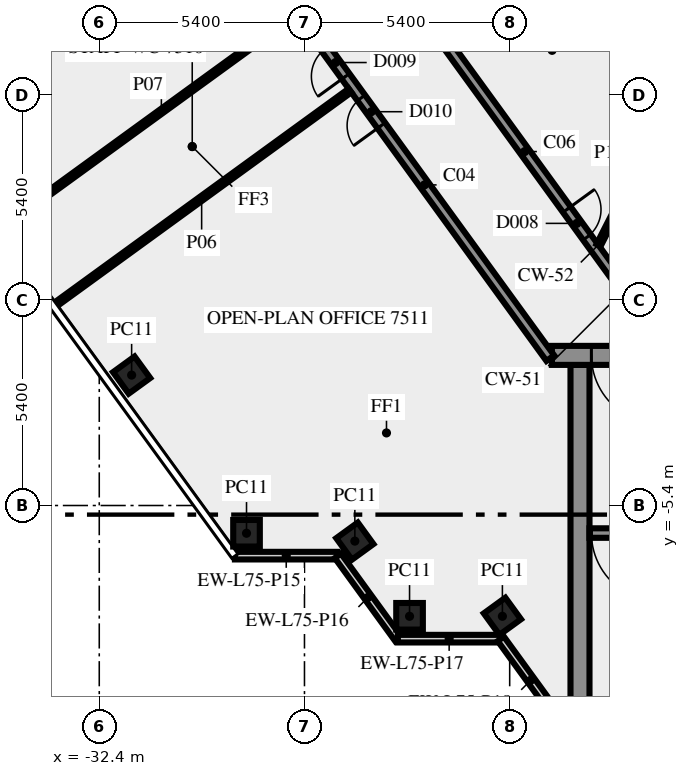
"""IFC4 building model, lengths in metres.
Left out: names, types, materials, properties, quantities, classifications, styles, units other than length and angle.
Written with IfcOpenShell. Run it as: python <this file> out.ifc"""

import sys

from ifc_helpers import new_model, si_unit, direction, frame, frame_2d, origin, origin_2d, place, context, subcontext, project, spatial, rectangle, extrude, element, fill, save


model = new_model("IFC4")
c1 = context("Model", 3, precision=1e-05, world=origin(), true_north=direction((0.0, 1.0)))
c2 = subcontext(c1, "Body", "Model", "MODEL_VIEW")
j1 = project(units=[si_unit("LENGTHUNIT", "METRE"), si_unit("PLANEANGLEUNIT", "RADIAN")], contexts=[c1])
p1 = place(None, origin())
s1 = spatial("IfcSite", under=j1, at=p1, CompositionType="ELEMENT")
p2 = place(p1, origin())
s2 = spatial("IfcBuilding", under=s1, at=p2, CompositionType="ELEMENT")
p3 = place(p2, frame((0.0, 0.0, 323.0)))
s3 = spatial("IfcBuildingStorey", under=s2, at=p3, CompositionType="ELEMENT", Elevation=323.0)
for number, where, z_axis, x_axis in (
    (1, (-31.548, -1.969, 0.0), (0.0, 0.0, 1.0), (0.588, -0.809, 0.0)),
    (2, (-28.525, -6.13, 0.0), (0.0, 0.0, 1.0), (1.0, 0.0, 0.0)),
    (3, (-25.674, -6.337, 0.0), (0.0, 0.0, 1.0), (0.588, -0.809, 0.0)),
    (4, (-24.235, -8.315, 0.0), (0.0, 0.0, 1.0), (1.0, 0.0, 0.0)),
    (5, (-21.792, -8.315, 0.0), (0.0, 0.0, 1.0), (0.588, -0.809, 0.0)),
):
    element("IfcColumn", number, at=place(p3, frame(where, z_axis=z_axis, x_axis=x_axis)), inside=s3, PredefinedType="COLUMN", context=c2, shape_type="SweptSolid", body=[
        extrude(rectangle(XDim=0.7, YDim=0.7, at=origin_2d()), origin(), (0.0, 0.0, 1.0), 3.65),
    ])
p4 = place(p3, frame((-28.83, -6.719, 0.0), z_axis=(0.0, 0.0, 1.0), x_axis=(1.0, 0.0, 0.0)))
e6 = element("IfcWall", 6, at=p4, inside=s3, PredefinedType="SOLIDWALL", context=c2, shape_type="SweptSolid", body=[
    extrude(rectangle(XDim=2.7, YDim=0.2, at=frame_2d((1.35, 0.0))), origin(), (0.0, 0.0, 1.0), 3.65),
])
p5 = place(p3, frame((-26.12, -6.724, 0.0), z_axis=(0.0, 0.0, 1.0), x_axis=(0.587720002413, -0.809064397168, 0.0)))
e7 = element("IfcWall", 7, at=p5, inside=s3, PredefinedType="SOLIDWALL", context=c2, shape_type="SweptSolid", body=[
    extrude(rectangle(XDim=2.7, YDim=0.2, at=frame_2d((1.35, 0.0))), origin(), (0.0, 0.0, 1.0), 3.65),
])
p6 = place(p3, frame((-24.543, -8.904, 0.0), z_axis=(0.0, 0.0, 1.0), x_axis=(1.0, 0.0, 0.0)))
e8 = element("IfcWall", 8, at=p6, inside=s3, PredefinedType="SOLIDWALL", context=c2, shape_type="SweptSolid", body=[
    extrude(rectangle(XDim=2.7, YDim=0.2, at=frame_2d((1.35, 0.0))), origin(), (0.0, 0.0, 1.0), 3.65),
])
p7 = place(p3, frame((-21.833, -8.909, 0.0), z_axis=(0.0, 0.0, 1.0), x_axis=(0.587766567315, -0.809030569476, 0.0)))
e9 = element("IfcWall", 9, at=p7, inside=s3, PredefinedType="SOLIDWALL", context=c2, shape_type="SweptSolid", body=[
    extrude(rectangle(XDim=2.688, YDim=0.2, at=frame_2d((1.344, 0.0))), origin(), (0.0, 0.0, 1.0), 3.65),
])
p8 = place(p3, frame((-19.75, -10.5, 0.0), z_axis=(0.0, 0.0, 1.0), x_axis=(0.0, 1.0, 0.0)))
e10 = element("IfcWall", 10, at=p8, inside=s3, PredefinedType="SHEAR", context=c2, shape_type="SweptSolid", body=[
    extrude(rectangle(XDim=8.8, YDim=0.5, at=frame_2d((4.4, 0.0))), origin(), (0.0, 0.0, 1.0), 3.65),
])
p9 = place(p3, frame((-11.45, -6.125, 0.0), z_axis=(0.0, 0.0, 1.0), x_axis=(-1.0, 0.0, 0.0)))
e11 = element("IfcWall", 11, at=p9, inside=s3, PredefinedType="SHEAR", context=c2, shape_type="SweptSolid", body=[
    extrude(rectangle(XDim=8.05, YDim=0.25, at=frame_2d((4.025, 0.0))), origin(), (0.0, 0.0, 1.0), 3.65),
])
p10 = place(p9, frame((6.2, 0.0, 0.0)))
e12 = element("IfcOpeningElement", 12, at=p10, cuts=e11, PredefinedType="OPENING", context=c2, shape_type="SweptSolid", body=[
    extrude(rectangle(XDim=1.8, YDim=2.1, at=frame_2d((0.9, 1.05))), frame((0.0, 0.135, 0.0), z_axis=(0.0, -1.0, 0.0), x_axis=(1.0, 0.0, 0.0)), (0.0, 0.0, 1.0), 0.27),
])
p11 = place(p3, frame((20.49, -1.45, 0.0), z_axis=(0.0, 0.0, 1.0), x_axis=(-1.0, 0.0, 0.0)))
e13 = element("IfcWall", 13, at=p11, inside=s3, PredefinedType="SHEAR", context=c2, shape_type="SweptSolid", body=[
    extrude(rectangle(XDim=40.98, YDim=0.5, at=frame_2d((20.49, 0.0))), origin(), (0.0, 0.0, 1.0), 3.65),
])
p12 = place(p11, frame((38.14, 0.0, 0.0)))
e14 = element("IfcOpeningElement", 14, at=p12, cuts=e13, PredefinedType="OPENING", context=c2, shape_type="SweptSolid", body=[
    extrude(rectangle(XDim=1.8, YDim=2.1, at=frame_2d((0.9, 1.05))), frame((0.0, 0.26, 0.0), z_axis=(0.0, -1.0, 0.0), x_axis=(1.0, 0.0, 0.0)), (0.0, 0.0, 1.0), 0.52),
])
p13 = place(p11, frame((35.89, 0.0, 0.0)))
e15 = element("IfcOpeningElement", 15, at=p13, cuts=e13, PredefinedType="OPENING", context=c2, shape_type="SweptSolid", body=[
    extrude(rectangle(XDim=0.9, YDim=2.1, at=frame_2d((0.45, 1.05))), frame((0.0, 0.26, 0.0), z_axis=(0.0, -1.0, 0.0), x_axis=(1.0, 0.0, 0.0)), (0.0, 0.0, 1.0), 0.52),
])
p14 = place(p11, frame((32.94, 0.0, 0.0)))
e16 = element("IfcOpeningElement", 16, at=p14, cuts=e13, PredefinedType="OPENING", context=c2, shape_type="SweptSolid", body=[
    extrude(rectangle(XDim=0.9, YDim=2.1, at=frame_2d((0.45, 1.05))), frame((0.0, 0.26, 0.0), z_axis=(0.0, -1.0, 0.0), x_axis=(1.0, 0.0, 0.0)), (0.0, 0.0, 1.0), 0.52),
])
p15 = place(p11, frame((31.015, 0.0, 0.0)))
e17 = element("IfcOpeningElement", 17, at=p15, cuts=e13, PredefinedType="OPENING", context=c2, shape_type="SweptSolid", body=[
    extrude(rectangle(XDim=0.8, YDim=2.1, at=frame_2d((0.4, 1.05))), frame((0.0, 0.26, 0.0), z_axis=(0.0, -1.0, 0.0), x_axis=(1.0, 0.0, 0.0)), (0.0, 0.0, 1.0), 0.52),
])
p16 = place(p11, frame((24.765, 0.0, 0.0)))
e18 = element("IfcOpeningElement", 18, at=p16, cuts=e13, PredefinedType="OPENING", context=c2, shape_type="SweptSolid", body=[
    extrude(rectangle(XDim=0.8, YDim=2.1, at=frame_2d((0.4, 1.05))), frame((0.0, 0.26, 0.0), z_axis=(0.0, -1.0, 0.0), x_axis=(1.0, 0.0, 0.0)), (0.0, 0.0, 1.0), 0.52),
])
p17 = place(p11, frame((21.765, 0.0, 0.0)))
e19 = element("IfcOpeningElement", 19, at=p17, cuts=e13, PredefinedType="OPENING", context=c2, shape_type="SweptSolid", body=[
    extrude(rectangle(XDim=2.0, YDim=2.1, at=frame_2d((1.0, 1.05))), frame((0.0, 0.26, 0.0), z_axis=(0.0, -1.0, 0.0), x_axis=(1.0, 0.0, 0.0)), (0.0, 0.0, 1.0), 0.52),
])
p18 = place(p11, frame((15.103, 0.0, 0.0)))
e20 = element("IfcOpeningElement", 20, at=p18, cuts=e13, PredefinedType="OPENING", context=c2, shape_type="SweptSolid", body=[
    extrude(rectangle(XDim=0.9, YDim=2.1, at=frame_2d((0.45, 1.05))), frame((0.0, 0.26, 0.0), z_axis=(0.0, -1.0, 0.0), x_axis=(1.0, 0.0, 0.0)), (0.0, 0.0, 1.0), 0.52),
])
p19 = place(p11, frame((13.04, 0.0, 0.0)))
e21 = element("IfcOpeningElement", 21, at=p19, cuts=e13, PredefinedType="OPENING", context=c2, shape_type="SweptSolid", body=[
    extrude(rectangle(XDim=0.9, YDim=2.1, at=frame_2d((0.45, 1.05))), frame((0.0, 0.26, 0.0), z_axis=(0.0, -1.0, 0.0), x_axis=(1.0, 0.0, 0.0)), (0.0, 0.0, 1.0), 0.52),
])
p20 = place(p11, frame((10.177, 0.0, 0.0)))
e22 = element("IfcOpeningElement", 22, at=p20, cuts=e13, PredefinedType="OPENING", context=c2, shape_type="SweptSolid", body=[
    extrude(rectangle(XDim=0.9, YDim=2.1, at=frame_2d((0.45, 1.05))), frame((0.0, 0.26, 0.0), z_axis=(0.0, -1.0, 0.0), x_axis=(1.0, 0.0, 0.0)), (0.0, 0.0, 1.0), 0.52),
])
p21 = place(p11, frame((7.14, 0.0, 0.0)))
e23 = element("IfcOpeningElement", 23, at=p21, cuts=e13, PredefinedType="OPENING", context=c2, shape_type="SweptSolid", body=[
    extrude(rectangle(XDim=0.9, YDim=2.1, at=frame_2d((0.45, 1.05))), frame((0.0, 0.26, 0.0), z_axis=(0.0, -1.0, 0.0), x_axis=(1.0, 0.0, 0.0)), (0.0, 0.0, 1.0), 0.52),
])
p22 = place(p11, frame((5.028, 0.0, 0.0)))
e24 = element("IfcOpeningElement", 24, at=p22, cuts=e13, PredefinedType="OPENING", context=c2, shape_type="SweptSolid", body=[
    extrude(rectangle(XDim=0.8, YDim=2.1, at=frame_2d((0.4, 1.05))), frame((0.0, 0.26, 0.0), z_axis=(0.0, -1.0, 0.0), x_axis=(1.0, 0.0, 0.0)), (0.0, 0.0, 1.0), 0.52),
])
p23 = place(p11, frame((3.452, 0.0, 0.0)))
e25 = element("IfcOpeningElement", 25, at=p23, cuts=e13, PredefinedType="OPENING", context=c2, shape_type="SweptSolid", body=[
    extrude(rectangle(XDim=0.8, YDim=2.1, at=frame_2d((0.4, 1.05))), frame((0.0, 0.26, 0.0), z_axis=(0.0, -1.0, 0.0), x_axis=(1.0, 0.0, 0.0)), (0.0, 0.0, 1.0), 0.52),
])
p24 = place(p11, frame((1.04, 0.0, 0.0)))
e26 = element("IfcOpeningElement", 26, at=p24, cuts=e13, PredefinedType="OPENING", context=c2, shape_type="SweptSolid", body=[
    extrude(rectangle(XDim=1.8, YDim=2.1, at=frame_2d((0.9, 1.05))), frame((0.0, 0.26, 0.0), z_axis=(0.0, -1.0, 0.0), x_axis=(1.0, 0.0, 0.0)), (0.0, 0.0, 1.0), 0.52),
])
p25 = place(p3, frame((-20.531, -1.523, 0.0), z_axis=(0.0, 0.0, 1.0), x_axis=(-0.587782646447, 0.809018887626, 0.0)))
e27 = element("IfcWall", 27, at=p25, inside=s3, PredefinedType="SOLIDWALL", context=c2, shape_type="SweptSolid", body=[
    extrude(rectangle(XDim=11.27, YDim=0.25, at=frame_2d((5.635, 0.0))), origin(), (0.0, 0.0, 1.0), 3.65),
])
p26 = place(p25, frame((7.566, 0.0, 0.0)))
e28 = element("IfcOpeningElement", 28, at=p26, cuts=e27, PredefinedType="OPENING", context=c2, shape_type="SweptSolid", body=[
    extrude(rectangle(XDim=0.9, YDim=2.1, at=frame_2d((0.45, 1.05))), frame((0.0, 0.135, 0.0), z_axis=(0.0, -1.0, 0.0), x_axis=(1.0, 0.0, 0.0)), (0.0, 0.0, 1.0), 0.27),
])
p27 = place(p25, frame((9.165, 0.0, 0.0)))
e29 = element("IfcOpeningElement", 29, at=p27, cuts=e27, PredefinedType="OPENING", context=c2, shape_type="SweptSolid", body=[
    extrude(rectangle(XDim=0.9, YDim=2.1, at=frame_2d((0.45, 1.05))), frame((0.0, 0.135, 0.0), z_axis=(0.0, -1.0, 0.0), x_axis=(1.0, 0.0, 0.0)), (0.0, 0.0, 1.0), 0.27),
])
p28 = place(p3, frame((-24.865, 8.95, 0.0), z_axis=(0.0, 0.0, 1.0), x_axis=(0.587791617212, -0.809012369952, 0.0)))
e30 = element("IfcWall", 30, at=p28, inside=s3, PredefinedType="SOLIDWALL", context=c2, shape_type="SweptSolid", body=[
    extrude(rectangle(XDim=12.453, YDim=0.25, at=frame_2d((6.227, 0.0))), origin(), (0.0, 0.0, 1.0), 3.65),
])
p29 = place(p28, frame((8.112, 0.0, 0.0)))
e31 = element("IfcOpeningElement", 31, at=p29, cuts=e30, PredefinedType="OPENING", context=c2, shape_type="SweptSolid", body=[
    extrude(rectangle(XDim=0.9, YDim=2.1, at=frame_2d((0.45, 1.05))), frame((0.0, 0.135, 0.0), z_axis=(0.0, -1.0, 0.0), x_axis=(1.0, 0.0, 0.0)), (0.0, 0.0, 1.0), 0.27),
])
p30 = place(p3, frame((-25.802, 5.519, 0.0), z_axis=(0.0, 0.0, 1.0), x_axis=(-0.808994179369, -0.587816653173, 0.0)))
e32 = element("IfcWall", 32, at=p30, inside=s3, PredefinedType="PARTITIONING", context=c2, shape_type="SweptSolid", body=[
    extrude(rectangle(XDim=9.651, YDim=0.12, at=frame_2d((4.825, 0.0))), origin(), (0.0, 0.0, 1.0), 2.95),
])
p31 = place(p3, frame((-34.291, 2.41, 0.0), z_axis=(0.0, 0.0, 1.0), x_axis=(0.809027940177, 0.587770186393, 0.0)))
e33 = element("IfcWall", 33, at=p31, inside=s3, PredefinedType="PARTITIONING", context=c2, shape_type="SweptSolid", body=[
    extrude(rectangle(XDim=8.715, YDim=0.12, at=frame_2d((4.357, 0.0))), origin(), (0.0, 0.0, 1.0), 3.65),
])
p32 = place(p3, frame((-19.261, 1.45, 0.0), z_axis=(0.0, 0.0, 1.0), x_axis=(0.453950796792, 0.891026752736, 0.0)))
e34 = element("IfcWall", 34, at=p32, inside=s3, PredefinedType="PARTITIONING", context=c2, shape_type="SweptSolid", body=[
    extrude(rectangle(XDim=2.778, YDim=0.12, at=frame_2d((1.389, 0.0))), origin(), (0.0, 0.0, 1.0), 3.65),
])
p33 = place(p10, origin())
e35 = element("IfcDoor", 35, at=p33, inside=s3, OperationType="DOUBLE_DOOR_SINGLE_SWING", PredefinedType="DOOR", context=c2, shape_type="SweptSolid", body=[
    extrude(rectangle(XDim=1.8, YDim=2.1, at=frame_2d((0.9, 1.05))), frame((0.0, 0.025, 0.0), z_axis=(0.0, -1.0, 0.0), x_axis=(1.0, 0.0, 0.0)), (0.0, 0.0, 1.0), 0.05),
])
fill(e12, e35)
p34 = place(p12, origin())
e36 = element("IfcDoor", 36, at=p34, inside=s3, OperationType="DOUBLE_DOOR_SINGLE_SWING", PredefinedType="DOOR", context=c2, shape_type="SweptSolid", body=[
    extrude(rectangle(XDim=1.8, YDim=2.1, at=frame_2d((0.9, 1.05))), frame((0.0, 0.025, 0.0), z_axis=(0.0, -1.0, 0.0), x_axis=(1.0, 0.0, 0.0)), (0.0, 0.0, 1.0), 0.05),
])
fill(e14, e36)
p35 = place(p29, origin())
e37 = element("IfcDoor", 37, at=p35, inside=s3, OperationType="SINGLE_SWING_RIGHT", PredefinedType="DOOR", context=c2, shape_type="SweptSolid", body=[
    extrude(rectangle(XDim=0.9, YDim=2.1, at=frame_2d((0.45, 1.05))), frame((0.0, 0.025, 0.0), z_axis=(0.0, -1.0, 0.0), x_axis=(1.0, 0.0, 0.0)), (0.0, 0.0, 1.0), 0.05),
])
fill(e31, e37)
p36 = place(p26, origin())
e38 = element("IfcDoor", 38, at=p36, inside=s3, OperationType="SINGLE_SWING_RIGHT", PredefinedType="DOOR", context=c2, shape_type="SweptSolid", body=[
    extrude(rectangle(XDim=0.9, YDim=2.1, at=frame_2d((0.45, 1.05))), frame((0.0, 0.025, 0.0), z_axis=(0.0, -1.0, 0.0), x_axis=(1.0, 0.0, 0.0)), (0.0, 0.0, 1.0), 0.05),
])
fill(e28, e38)
p37 = place(p27, origin())
e39 = element("IfcDoor", 39, at=p37, inside=s3, OperationType="SINGLE_SWING_LEFT", PredefinedType="DOOR", context=c2, shape_type="SweptSolid", body=[
    extrude(rectangle(XDim=0.9, YDim=2.1, at=frame_2d((0.45, 1.05))), frame((0.0, 0.025, 0.0), z_axis=(0.0, -1.0, 0.0), x_axis=(1.0, 0.0, 0.0)), (0.0, 0.0, 1.0), 0.05),
])
fill(e29, e39)
save(model, sys.argv[1])
